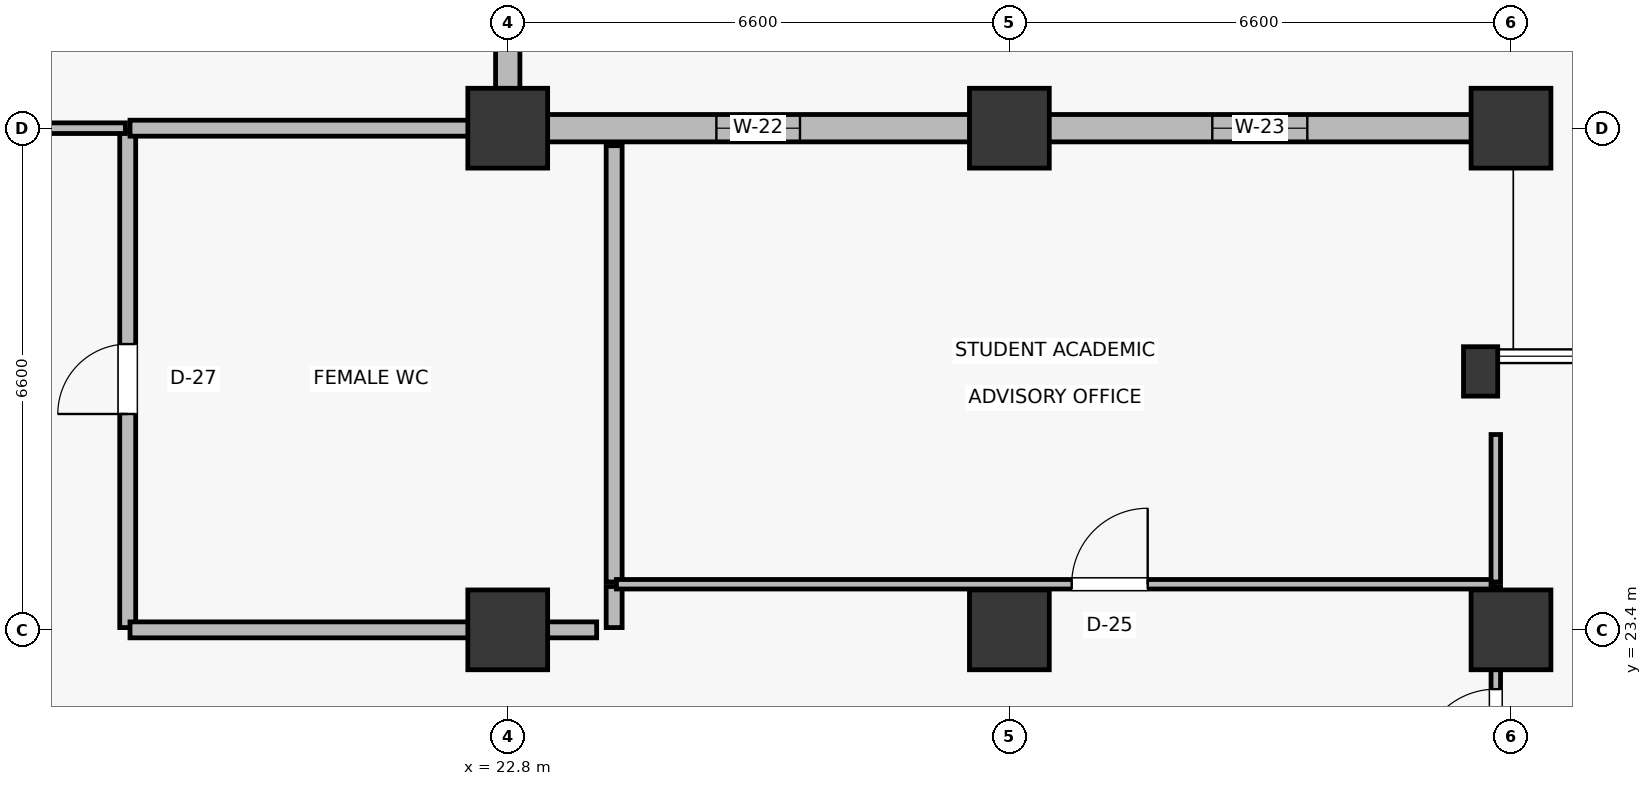
"""IFC4 building model, lengths in metres.
Left out: names, types, materials, properties, quantities, classifications, styles, units other than length and angle.
Written with IfcOpenShell. Run it as: python <this file> out.ifc"""

import sys

from ifc_helpers import new_model, si_unit, direction, frame, frame_2d, origin, origin_2d, place, context, subcontext, project, spatial, rectangle, extrude, element, fill, save


model = new_model("IFC4")
c1 = context("Model", 3, precision=1e-05, world=origin(), true_north=direction((0.0, 1.0)))
c2 = subcontext(c1, "Body", "Model", "MODEL_VIEW")
j1 = project(units=[si_unit("LENGTHUNIT", "METRE"), si_unit("PLANEANGLEUNIT", "RADIAN")], contexts=[c1])
p1 = place(None, origin())
s1 = spatial("IfcSite", under=j1, at=p1, CompositionType="ELEMENT")
p2 = place(p1, origin())
s2 = spatial("IfcBuilding", under=s1, at=p2, CompositionType="ELEMENT")
p3 = place(p2, origin())
s3 = spatial("IfcBuildingStorey", under=s2, at=p3, CompositionType="ELEMENT", Elevation=0.0)
for number, where, z_axis, x_axis in (
    (1, (22.8, 23.4, 0.0), (0.0, 0.0, 1.0), (1.0, 0.0, 0.0)),
    (2, (22.8, 30.0, 0.0), (0.0, 0.0, 1.0), (1.0, 0.0, 0.0)),
    (3, (29.4, 23.4, 0.0), (0.0, 0.0, 1.0), (1.0, 0.0, 0.0)),
    (4, (29.4, 30.0, 0.0), (0.0, 0.0, 1.0), (1.0, 0.0, 0.0)),
    (5, (36.0, 23.4, 0.0), (0.0, 0.0, 1.0), (1.0, 0.0, 0.0)),
    (6, (36.0, 30.0, 0.0), (0.0, 0.0, 1.0), (1.0, 0.0, 0.0)),
):
    element("IfcColumn", number, at=place(p3, frame(where, z_axis=z_axis, x_axis=x_axis)), inside=s3, PredefinedType="COLUMN", context=c2, shape_type="SweptSolid", body=[
        extrude(rectangle(XDim=1.05, YDim=1.05, at=origin_2d()), origin(), (0.0, 0.0, 1.0), 5.4),
    ])
p4 = place(p3, frame((35.6, 26.8, 0.0), z_axis=(0.0, 0.0, 1.0), x_axis=(1.0, 0.0, 0.0)))
e7 = element("IfcColumn", 7, at=p4, inside=s3, PredefinedType="PILASTER", context=c2, shape_type="SweptSolid", body=[
    extrude(rectangle(XDim=0.45, YDim=0.65, at=origin_2d()), origin(), (0.0, 0.0, 1.0), 5.4),
])
p5 = place(p3, frame((23.305, 30.0, 0.0), z_axis=(0.0, 0.0, 1.0), x_axis=(1.0, 0.0, 0.0)))
e8 = element("IfcWall", 8, at=p5, inside=s3, PredefinedType="SOLIDWALL", context=c2, shape_type="SweptSolid", body=[
    extrude(rectangle(XDim=5.58, YDim=0.36, at=frame_2d((2.79, 0.0))), origin(), (0.0, 0.0, 1.0), 4.255),
])
p6 = place(p5, frame((2.24, 0.0, 0.9)))
e9 = element("IfcOpeningElement", 9, at=p6, cuts=e8, PredefinedType="OPENING", context=c2, shape_type="SweptSolid", body=[
    extrude(rectangle(XDim=1.1, YDim=1.75, at=frame_2d((0.55, 0.875))), frame((0.0, 0.19, 0.0), z_axis=(0.0, -1.0, 0.0), x_axis=(1.0, 0.0, 0.0)), (0.0, 0.0, 1.0), 0.38),
])
p7 = place(p3, frame((29.905, 30.0, 0.0), z_axis=(0.0, 0.0, 1.0), x_axis=(1.0, 0.0, 0.0)))
e10 = element("IfcWall", 10, at=p7, inside=s3, PredefinedType="SOLIDWALL", context=c2, shape_type="SweptSolid", body=[
    extrude(rectangle(XDim=5.58, YDim=0.36, at=frame_2d((2.79, 0.0))), origin(), (0.0, 0.0, 1.0), 4.425),
])
p8 = place(p7, frame((2.165, 0.0, 0.9)))
e11 = element("IfcOpeningElement", 11, at=p8, cuts=e10, PredefinedType="OPENING", context=c2, shape_type="SweptSolid", body=[
    extrude(rectangle(XDim=1.25, YDim=1.8, at=frame_2d((0.625, 0.9))), frame((0.0, 0.19, 0.0), z_axis=(0.0, -1.0, 0.0), x_axis=(1.0, 0.0, 0.0)), (0.0, 0.0, 1.0), 0.38),
])
p9 = place(p3, frame((22.8, 30.505, 0.0), z_axis=(0.0, 0.0, 1.0), x_axis=(0.0, 1.0, 0.0)))
e12 = element("IfcWall", 12, at=p9, inside=s3, PredefinedType="SOLIDWALL", context=c2, shape_type="SweptSolid", body=[
    extrude(rectangle(XDim=8.06, YDim=0.32, at=frame_2d((4.03, 0.0))), origin(), (0.0, 0.0, 1.0), 4.425),
])
p10 = place(p9, frame((3.13, 0.0, 0.9)))
e13 = element("IfcOpeningElement", 13, at=p10, cuts=e12, PredefinedType="OPENING", context=c2, shape_type="SweptSolid", body=[
    extrude(rectangle(XDim=1.8, YDim=1.75, at=frame_2d((0.9, 0.875))), frame((0.0, 0.17, 0.0), z_axis=(0.0, -1.0, 0.0), x_axis=(1.0, 0.0, 0.0)), (0.0, 0.0, 1.0), 0.34),
])
p11 = place(p3, frame((24.2, 24.03, 0.0), z_axis=(0.0, 0.0, 1.0), x_axis=(0.0, 1.0, 0.0)))
e14 = element("IfcWall", 14, at=p11, inside=s3, PredefinedType="PLUMBINGWALL", context=c2, shape_type="SweptSolid", body=[
    extrude(rectangle(XDim=5.74, YDim=0.21, at=frame_2d((2.87, 0.0))), origin(), (0.0, 0.0, 1.0), 4.255),
])
p12 = place(p3, frame((24.2, 23.43, 0.0), z_axis=(0.0, 0.0, 1.0), x_axis=(0.0, 1.0, 0.0)))
e15 = element("IfcWall", 15, at=p12, inside=s3, PredefinedType="PLUMBINGWALL", context=c2, shape_type="SweptSolid", body=[
    extrude(rectangle(XDim=0.54, YDim=0.21, at=frame_2d((0.27, 0.0))), origin(), (0.0, 0.0, 1.0), 4.425),
])
p13 = place(p3, frame((17.8, 23.43, 0.0), z_axis=(0.0, 0.0, 1.0), x_axis=(0.0, 1.0, 0.0)))
e16 = element("IfcWall", 16, at=p13, inside=s3, PredefinedType="PLUMBINGWALL", context=c2, shape_type="SweptSolid", body=[
    extrude(rectangle(XDim=6.54, YDim=0.21, at=frame_2d((3.27, 0.0))), origin(), (0.0, 0.0, 1.0), 4.325),
])
p14 = place(p13, frame((2.81, 0.0, 0.0)))
e17 = element("IfcOpeningElement", 17, at=p14, cuts=e16, PredefinedType="OPENING", context=c2, shape_type="SweptSolid", body=[
    extrude(rectangle(XDim=0.92, YDim=2.1, at=frame_2d((0.46, 1.05))), frame((0.0, 0.115, 0.0), z_axis=(0.0, -1.0, 0.0), x_axis=(1.0, 0.0, 0.0)), (0.0, 0.0, 1.0), 0.23),
])
p15 = place(p3, frame((17.83, 23.4, 0.0), z_axis=(0.0, 0.0, 1.0), x_axis=(1.0, 0.0, 0.0)))
e18 = element("IfcWall", 18, at=p15, inside=s3, PredefinedType="PLUMBINGWALL", context=c2, shape_type="SweptSolid", body=[
    extrude(rectangle(XDim=6.14, YDim=0.21, at=frame_2d((3.07, 0.0))), origin(), (0.0, 0.0, 1.0), 4.425),
])
p16 = place(p3, frame((17.83, 30.0, 0.0), z_axis=(0.0, 0.0, 1.0), x_axis=(1.0, 0.0, 0.0)))
e19 = element("IfcWall", 19, at=p16, inside=s3, PredefinedType="PLUMBINGWALL", context=c2, shape_type="SweptSolid", body=[
    extrude(rectangle(XDim=4.74, YDim=0.21, at=frame_2d((2.37, 0.0))), origin(), (0.0, 0.0, 1.0), 4.325),
])
p17 = place(p3, frame((24.23, 24.0, 0.0), z_axis=(0.0, 0.0, 1.0), x_axis=(1.0, 0.0, 0.0)))
e20 = element("IfcWall", 20, at=p17, inside=s3, PredefinedType="PARTITIONING", context=c2, shape_type="SweptSolid", body=[
    extrude(rectangle(XDim=11.54, YDim=0.125, at=frame_2d((5.77, 0.0))), origin(), (0.0, 0.0, 1.0), 4.505),
])
p18 = place(p17, frame((5.99, 0.0, 0.0)))
e21 = element("IfcOpeningElement", 21, at=p18, cuts=e20, PredefinedType="OPENING", context=c2, shape_type="SweptSolid", body=[
    extrude(rectangle(XDim=1.0, YDim=2.15, at=frame_2d((0.5, 1.075))), frame((0.0, 0.073, 0.0), z_axis=(0.0, -1.0, 0.0), x_axis=(1.0, 0.0, 0.0)), (0.0, 0.0, 1.0), 0.145),
])
p19 = place(p3, frame((35.8, 24.03, 0.0), z_axis=(0.0, 0.0, 1.0), x_axis=(0.0, 1.0, 0.0)))
e22 = element("IfcWall", 22, at=p19, inside=s3, PredefinedType="PARTITIONING", context=c2, shape_type="SweptSolid", body=[
    extrude(rectangle(XDim=1.94, YDim=0.125, at=frame_2d((0.97, 0.0))), origin(), (0.0, 0.0, 1.0), 4.505),
])
p20 = place(p3, frame((35.8, 20.63, 0.0), z_axis=(0.0, 0.0, 1.0), x_axis=(0.0, 1.0, 0.0)))
e23 = element("IfcWall", 23, at=p20, inside=s3, PredefinedType="PARTITIONING", context=c2, shape_type="SweptSolid", body=[
    extrude(rectangle(XDim=3.34, YDim=0.125, at=frame_2d((1.67, 0.0))), origin(), (0.0, 0.0, 1.0), 4.325),
])
p21 = place(p20, frame((0.99, 0.0, 0.0)))
e24 = element("IfcOpeningElement", 24, at=p21, cuts=e23, PredefinedType="OPENING", context=c2, shape_type="SweptSolid", body=[
    extrude(rectangle(XDim=1.0, YDim=2.15, at=frame_2d((0.5, 1.075))), frame((0.0, 0.073, 0.0), z_axis=(0.0, -1.0, 0.0), x_axis=(1.0, 0.0, 0.0)), (0.0, 0.0, 1.0), 0.145),
])
p22 = place(p3, frame((13.43, 30.0, 0.0), z_axis=(0.0, 0.0, 1.0), x_axis=(1.0, 0.0, 0.0)))
e25 = element("IfcWall", 25, at=p22, inside=s3, PredefinedType="PARTITIONING", context=c2, shape_type="SweptSolid", body=[
    extrude(rectangle(XDim=4.34, YDim=0.14, at=frame_2d((2.17, 0.0))), origin(), (0.0, 0.0, 1.0), 4.215),
])
p23 = place(p22, frame((0.875, 0.0, 0.0)))
e26 = element("IfcOpeningElement", 26, at=p23, cuts=e25, PredefinedType="OPENING", context=c2, shape_type="SweptSolid", body=[
    extrude(rectangle(XDim=1.15, YDim=2.15, at=frame_2d((0.575, 1.075))), frame((0.0, 0.08, 0.0), z_axis=(0.0, -1.0, 0.0), x_axis=(1.0, 0.0, 0.0)), (0.0, 0.0, 1.0), 0.16),
])
p24 = place(p6, origin())
e27 = element("IfcWindow", 27, at=p24, inside=s3, PartitioningType="DOUBLE_PANEL_VERTICAL", PredefinedType="WINDOW", context=c2, shape_type="SweptSolid", body=[
    extrude(rectangle(XDim=1.1, YDim=1.75, at=frame_2d((0.55, 0.875))), frame((0.0, 0.03, 0.0), z_axis=(0.0, -1.0, 0.0), x_axis=(1.0, 0.0, 0.0)), (0.0, 0.0, 1.0), 0.06),
])
fill(e9, e27)
p25 = place(p8, origin())
e28 = element("IfcWindow", 28, at=p25, inside=s3, PartitioningType="DOUBLE_PANEL_VERTICAL", PredefinedType="WINDOW", context=c2, shape_type="SweptSolid", body=[
    extrude(rectangle(XDim=1.25, YDim=1.8, at=frame_2d((0.625, 0.9))), frame((0.0, 0.03, 0.0), z_axis=(0.0, -1.0, 0.0), x_axis=(1.0, 0.0, 0.0)), (0.0, 0.0, 1.0), 0.06),
])
fill(e11, e28)
p26 = place(p14, origin())
e29 = element("IfcDoor", 29, at=p26, inside=s3, OperationType="SINGLE_SWING_LEFT", PredefinedType="DOOR", context=c2, shape_type="SweptSolid", body=[
    extrude(rectangle(XDim=0.92, YDim=2.1, at=frame_2d((0.46, 1.05))), frame((0.0, 0.025, 0.0), z_axis=(0.0, -1.0, 0.0), x_axis=(1.0, 0.0, 0.0)), (0.0, 0.0, 1.0), 0.05),
])
fill(e17, e29)
p27 = place(p18, origin())
e30 = element("IfcDoor", 30, at=p27, inside=s3, OperationType="SINGLE_SWING_RIGHT", PredefinedType="DOOR", context=c2, shape_type="SweptSolid", body=[
    extrude(rectangle(XDim=1.0, YDim=2.15, at=frame_2d((0.5, 1.075))), frame((0.0, 0.025, 0.0), z_axis=(0.0, -1.0, 0.0), x_axis=(1.0, 0.0, 0.0)), (0.0, 0.0, 1.0), 0.05),
])
fill(e21, e30)
p28 = place(p21, origin())
e31 = element("IfcDoor", 31, at=p28, inside=s3, OperationType="SINGLE_SWING_LEFT", PredefinedType="DOOR", context=c2, shape_type="SweptSolid", body=[
    extrude(rectangle(XDim=1.0, YDim=2.15, at=frame_2d((0.5, 1.075))), frame((0.0, 0.025, 0.0), z_axis=(0.0, -1.0, 0.0), x_axis=(1.0, 0.0, 0.0)), (0.0, 0.0, 1.0), 0.05),
])
fill(e24, e31)
save(model, sys.argv[1])
